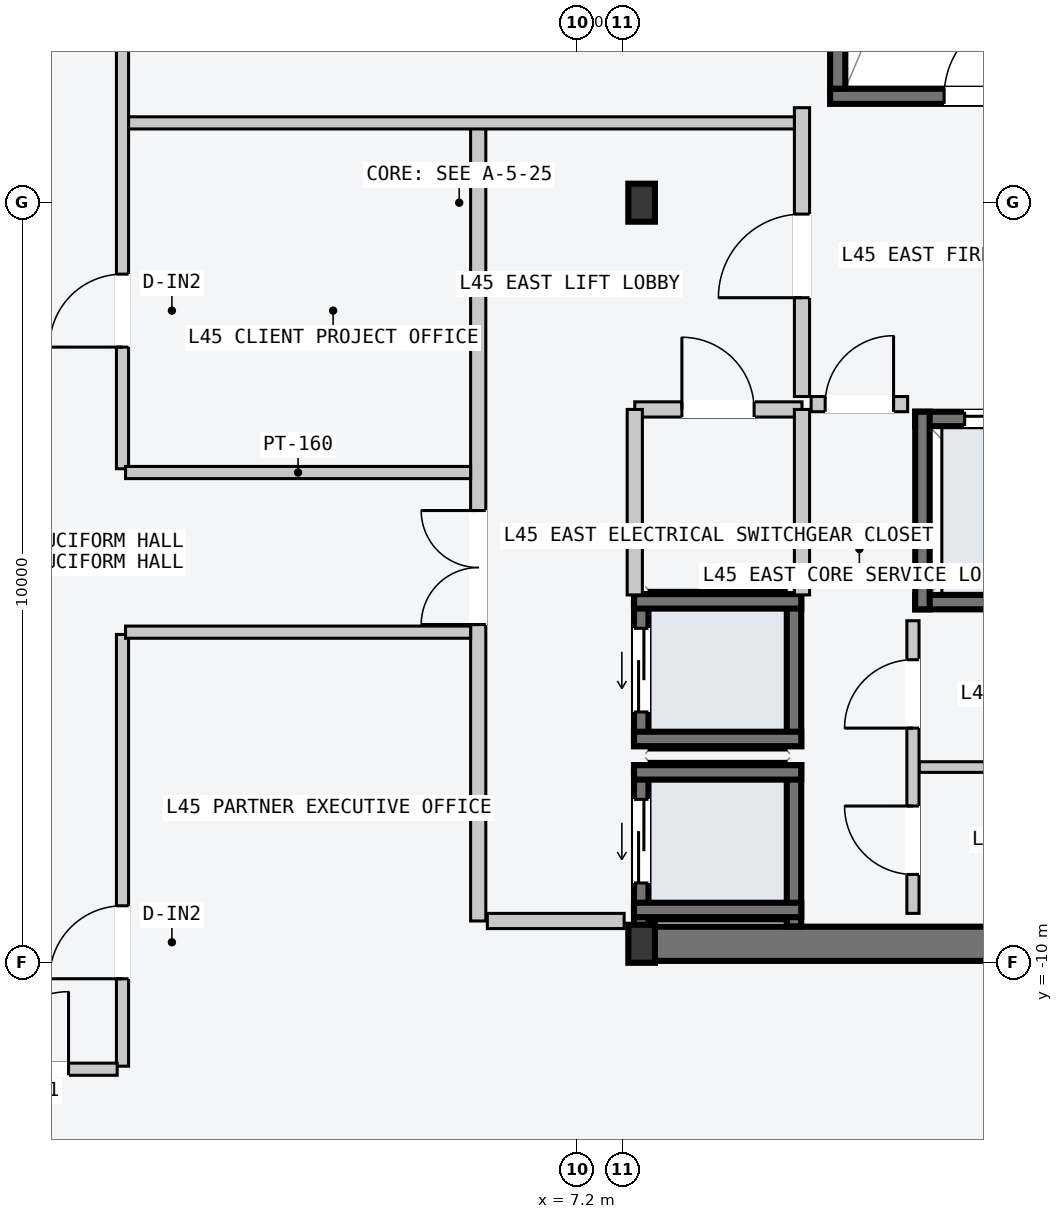
"""IFC4 building model, lengths in metres.
Left out: names, types, materials, properties, quantities, classifications, styles, units other than length and angle.
Written with IfcOpenShell. Run it as: python <this file> out.ifc"""

import sys

from ifc_helpers import new_model, si_unit, direction, frame, frame_2d, origin, origin_2d, place, context, subcontext, project, spatial, rectangle, i_section, extrude, element, fill, save


model = new_model("IFC4")
c1 = context("Model", 3, precision=1e-05, world=origin(), true_north=direction((0.0, 1.0)))
c2 = subcontext(c1, "Body", "Model", "MODEL_VIEW")
j1 = project(units=[si_unit("LENGTHUNIT", "METRE"), si_unit("PLANEANGLEUNIT", "RADIAN")], contexts=[c1])
p1 = place(None, origin())
s1 = spatial("IfcSite", under=j1, at=p1, CompositionType="ELEMENT")
p2 = place(p1, origin())
s2 = spatial("IfcBuilding", under=s1, at=p2, CompositionType="ELEMENT")
p3 = place(p2, frame((0.0, 0.0, 173.1)))
s3 = spatial("IfcBuildingStorey", under=s2, at=p3, CompositionType="ELEMENT", Elevation=173.1)
p4 = place(p3, frame((8.07, -9.75, -0.2), z_axis=(0.0, 0.0, 1.0), x_axis=(1.0, 0.0, 0.0)))
e1 = element("IfcWall", 1, at=p4, inside=s3, PredefinedType="SHEAR", context=c2, shape_type="SweptSolid", body=[
    extrude(rectangle(XDim=6.46, YDim=0.45, at=frame_2d((3.23, 0.0))), origin(), (0.0, 0.0, 1.0), 3.6),
])
p5 = place(p3, frame((10.53, 1.4, -0.2), z_axis=(0.0, 0.0, 1.0), x_axis=(1.0, 0.0, 0.0)))
e2 = element("IfcWall", 2, at=p5, inside=s3, PredefinedType="SOLIDWALL", context=c2, shape_type="SweptSolid", body=[
    extrude(rectangle(XDim=3.72, YDim=0.2, at=frame_2d((1.86, 0.0))), origin(), (0.0, 0.0, 1.0), 3.6),
])
p6 = place(p5, frame((1.5, 0.0, 0.2)))
e3 = element("IfcOpeningElement", 3, at=p6, cuts=e2, PredefinedType="OPENING", context=c2, shape_type="SweptSolid", body=[
    extrude(rectangle(XDim=1.12, YDim=2.18, at=frame_2d((0.56, 1.09))), frame((0.0, 0.11, 0.0), z_axis=(0.0, -1.0, 0.0), x_axis=(1.0, 0.0, 0.0)), (0.0, 0.0, 1.0), 0.22),
])
p7 = place(p3, frame((10.63, 1.5, -0.2), z_axis=(0.0, 0.0, 1.0), x_axis=(0.0, 1.0, 0.0)))
e4 = element("IfcWall", 4, at=p7, inside=s3, PredefinedType="SOLIDWALL", context=c2, shape_type="SweptSolid", body=[
    extrude(rectangle(XDim=7.8, YDim=0.2, at=frame_2d((3.9, 0.0))), origin(), (0.0, 0.0, 1.0), 3.6),
])
for number, where, z_axis, x_axis in (
    (5, (8.05, -9.75, 0.0), (0.0, 0.0, 1.0), (1.0, 0.0, 0.0)),
    (6, (8.05, 0.0, 0.0), (0.0, 0.0, 1.0), (1.0, 0.0, 0.0)),
):
    element("IfcColumn", number, at=place(p3, frame(where, z_axis=z_axis, x_axis=x_axis)), inside=s3, PredefinedType="COLUMN", context=c2, shape_type="SweptSolid", body=[
        extrude(i_section(OverallWidth=0.35, OverallDepth=0.5, WebThickness=0.02, FlangeThickness=0.032, at=origin_2d()), origin(), (0.0, 0.0, 1.0), 3.6),
    ])
p8 = place(p3, frame((8.045, -9.52, -0.2), z_axis=(0.0, 0.0, 1.0), x_axis=(0.0, 1.0, 0.0)))
e7 = element("IfcWall", 7, at=p8, inside=s3, PredefinedType="SOLIDWALL", context=c2, shape_type="SweptSolid", body=[
    extrude(rectangle(XDim=2.12, YDim=0.19, at=frame_2d((1.06, 0.0))), origin(), (0.0, 0.0, 1.0), 3.6),
])
p9 = place(p8, frame((0.57, 0.0, 0.2)))
e8 = element("IfcOpeningElement", 8, at=p9, cuts=e7, PredefinedType="OPENING", context=c2, shape_type="SweptSolid", body=[
    extrude(rectangle(XDim=1.1, YDim=2.2, at=frame_2d((0.55, 1.1))), frame((0.0, 0.105, 0.0), z_axis=(0.0, -1.0, 0.0), x_axis=(1.0, 0.0, 0.0)), (0.0, 0.0, 1.0), 0.21),
])
p10 = place(p3, frame((10.055, -9.52, -0.2), z_axis=(0.0, 0.0, 1.0), x_axis=(0.0, 1.0, 0.0)))
e9 = element("IfcWall", 9, at=p10, inside=s3, PredefinedType="SOLIDWALL", context=c2, shape_type="SweptSolid", body=[
    extrude(rectangle(XDim=2.12, YDim=0.19, at=frame_2d((1.06, 0.0))), origin(), (0.0, 0.0, 1.0), 3.6),
])
for number, where, z_axis, x_axis in (
    (10, (7.95, -7.495, -0.2), (0.0, 0.0, 1.0), (1.0, 0.0, 0.0)),
    (11, (7.95, -9.305, -0.2), (0.0, 0.0, 1.0), (1.0, 0.0, 0.0)),
):
    element("IfcWall", number, at=place(p3, frame(where, z_axis=z_axis, x_axis=x_axis)), inside=s3, PredefinedType="SOLIDWALL", context=c2, shape_type="SweptSolid", body=[
        extrude(rectangle(XDim=2.2, YDim=0.19, at=frame_2d((1.1, 0.0))), origin(), (0.0, 0.0, 1.0), 3.6),
    ])
p11 = place(p3, frame((8.045, -7.15, -0.2), z_axis=(0.0, 0.0, 1.0), x_axis=(0.0, 1.0, 0.0)))
e12 = element("IfcWall", 12, at=p11, inside=s3, PredefinedType="SOLIDWALL", context=c2, shape_type="SweptSolid", body=[
    extrude(rectangle(XDim=2.0, YDim=0.19, at=frame_2d((1.0, 0.0))), origin(), (0.0, 0.0, 1.0), 3.6),
])
p12 = place(p11, frame((0.45, 0.0, 0.2)))
e13 = element("IfcOpeningElement", 13, at=p12, cuts=e12, PredefinedType="OPENING", context=c2, shape_type="SweptSolid", body=[
    extrude(rectangle(XDim=1.1, YDim=2.2, at=frame_2d((0.55, 1.1))), frame((0.0, 0.105, 0.0), z_axis=(0.0, -1.0, 0.0), x_axis=(1.0, 0.0, 0.0)), (0.0, 0.0, 1.0), 0.21),
])
p13 = place(p3, frame((10.055, -7.15, -0.2), z_axis=(0.0, 0.0, 1.0), x_axis=(0.0, 1.0, 0.0)))
e14 = element("IfcWall", 14, at=p13, inside=s3, PredefinedType="SOLIDWALL", context=c2, shape_type="SweptSolid", body=[
    extrude(rectangle(XDim=2.0, YDim=0.19, at=frame_2d((1.0, 0.0))), origin(), (0.0, 0.0, 1.0), 3.6),
])
for number, where, z_axis, x_axis in (
    (15, (7.95, -5.245, -0.2), (0.0, 0.0, 1.0), (1.0, 0.0, 0.0)),
    (16, (7.95, -7.055, -0.2), (0.0, 0.0, 1.0), (1.0, 0.0, 0.0)),
):
    element("IfcWall", number, at=place(p3, frame(where, z_axis=z_axis, x_axis=x_axis)), inside=s3, PredefinedType="SOLIDWALL", context=c2, shape_type="SweptSolid", body=[
        extrude(rectangle(XDim=2.2, YDim=0.19, at=frame_2d((1.1, 0.0))), origin(), (0.0, 0.0, 1.0), 3.6),
    ])
p14 = place(p3, frame((11.65, -2.845, -0.2), z_axis=(0.0, 0.0, 1.0), x_axis=(1.0, 0.0, 0.0)))
e17 = element("IfcWall", 17, at=p14, inside=s3, PredefinedType="SOLIDWALL", context=c2, shape_type="SweptSolid", body=[
    extrude(rectangle(XDim=2.68, YDim=0.19, at=frame_2d((1.34, 0.0))), origin(), (0.0, 0.0, 1.0), 3.6),
])
p15 = place(p14, frame((0.65, 0.0, 0.2)))
e18 = element("IfcOpeningElement", 18, at=p15, cuts=e17, PredefinedType="OPENING", context=c2, shape_type="SweptSolid", body=[
    extrude(rectangle(XDim=1.2, YDim=2.2, at=frame_2d((0.6, 1.1))), frame((0.0, 0.105, 0.0), z_axis=(0.0, -1.0, 0.0), x_axis=(1.0, 0.0, 0.0)), (0.0, 0.0, 1.0), 0.21),
])
p16 = place(p3, frame((11.65, -5.255, -0.2), z_axis=(0.0, 0.0, 1.0), x_axis=(1.0, 0.0, 0.0)))
e19 = element("IfcWall", 19, at=p16, inside=s3, PredefinedType="SOLIDWALL", context=c2, shape_type="SweptSolid", body=[
    extrude(rectangle(XDim=2.68, YDim=0.19, at=frame_2d((1.34, 0.0))), origin(), (0.0, 0.0, 1.0), 3.6),
])
p17 = place(p3, frame((11.745, -5.35, -0.2), z_axis=(0.0, 0.0, 1.0), x_axis=(0.0, 1.0, 0.0)))
e20 = element("IfcWall", 20, at=p17, inside=s3, PredefinedType="SOLIDWALL", context=c2, shape_type="SweptSolid", body=[
    extrude(rectangle(XDim=2.6, YDim=0.19, at=frame_2d((1.3, 0.0))), origin(), (0.0, 0.0, 1.0), 3.6),
])
p18 = place(p3, frame((5.9, -9.45, 0.0), z_axis=(0.0, 0.0, 1.0), x_axis=(0.0, 1.0, 0.0)))
e21 = element("IfcWall", 21, at=p18, inside=s3, PredefinedType="PARTITIONING", context=c2, shape_type="SweptSolid", body=[
    extrude(rectangle(XDim=10.5, YDim=0.2, at=frame_2d((5.25, 0.0))), origin(), (0.0, 0.0, 1.0), 3.4),
])
p19 = place(p18, frame((3.9, 0.0, 0.0)))
e22 = element("IfcOpeningElement", 22, at=p19, cuts=e21, PredefinedType="OPENING", context=c2, shape_type="SweptSolid", body=[
    extrude(rectangle(XDim=1.5, YDim=2.2, at=frame_2d((0.75, 1.1))), frame((0.0, 0.11, 0.0), z_axis=(0.0, -1.0, 0.0), x_axis=(1.0, 0.0, 0.0)), (0.0, 0.0, 1.0), 0.22),
])
p20 = place(p3, frame((6.02, -9.45, 0.0), z_axis=(0.0, 0.0, 1.0), x_axis=(1.0, 0.0, 0.0)))
e23 = element("IfcWall", 23, at=p20, inside=s3, PredefinedType="PARTITIONING", context=c2, shape_type="SweptSolid", body=[
    extrude(rectangle(XDim=1.8, YDim=0.2, at=frame_2d((0.9, 0.0))), origin(), (0.0, 0.0, 1.0), 3.4),
])
p21 = place(p3, frame((10.16, -2.55, 0.0), z_axis=(0.0, 0.0, 1.0), x_axis=(0.0, 1.0, 0.0)))
e24 = element("IfcWall", 24, at=p21, inside=s3, PredefinedType="PARTITIONING", context=c2, shape_type="SweptSolid", body=[
    extrude(rectangle(XDim=3.8, YDim=0.2, at=frame_2d((1.9, 0.0))), origin(), (0.0, 0.0, 1.0), 3.4),
])
p22 = place(p21, frame((1.3, 0.0, 0.0)))
e25 = element("IfcOpeningElement", 25, at=p22, cuts=e24, PredefinedType="OPENING", context=c2, shape_type="SweptSolid", body=[
    extrude(rectangle(XDim=1.1, YDim=2.15, at=frame_2d((0.55, 1.075))), frame((0.0, 0.11, 0.0), z_axis=(0.0, -1.0, 0.0), x_axis=(1.0, 0.0, 0.0)), (0.0, 0.0, 1.0), 0.22),
])
p23 = place(p3, frame((10.28, -2.65, 0.0), z_axis=(0.0, 0.0, 1.0), x_axis=(1.0, 0.0, 0.0)))
e26 = element("IfcWall", 26, at=p23, inside=s3, PredefinedType="PARTITIONING", context=c2, shape_type="SweptSolid", body=[
    extrude(rectangle(XDim=1.27, YDim=0.2, at=frame_2d((0.635, 0.0))), origin(), (0.0, 0.0, 1.0), 3.4),
])
p24 = place(p23, frame((0.185, 0.0, 0.0)))
e27 = element("IfcOpeningElement", 27, at=p24, cuts=e26, PredefinedType="OPENING", context=c2, shape_type="SweptSolid", body=[
    extrude(rectangle(XDim=0.9, YDim=2.15, at=frame_2d((0.45, 1.075))), frame((0.0, 0.11, 0.0), z_axis=(0.0, -1.0, 0.0), x_axis=(1.0, 0.0, 0.0)), (0.0, 0.0, 1.0), 0.22),
])
p25 = place(p3, frame((7.96, -2.72, 0.0), z_axis=(0.0, 0.0, 1.0), x_axis=(1.0, 0.0, 0.0)))
e28 = element("IfcWall", 28, at=p25, inside=s3, PredefinedType="PARTITIONING", context=c2, shape_type="SweptSolid", body=[
    extrude(rectangle(XDim=2.2, YDim=0.2, at=frame_2d((1.1, 0.0))), origin(), (0.0, 0.0, 1.0), 3.4),
])
p26 = place(p25, frame((0.62, 0.0, 0.0)))
e29 = element("IfcOpeningElement", 29, at=p26, cuts=e28, PredefinedType="OPENING", context=c2, shape_type="SweptSolid", body=[
    extrude(rectangle(XDim=0.95, YDim=2.1, at=frame_2d((0.475, 1.05))), frame((0.0, 0.11, 0.0), z_axis=(0.0, -1.0, 0.0), x_axis=(1.0, 0.0, 0.0)), (0.0, 0.0, 1.0), 0.22),
])
for number, where, z_axis, x_axis in (
    (30, (7.96, -5.16, 0.0), (0.0, 0.0, 1.0), (0.0, 1.0, 0.0)),
    (31, (10.16, -5.16, 0.0), (0.0, 0.0, 1.0), (0.0, 1.0, 0.0)),
):
    element("IfcWall", number, at=place(p3, frame(where, z_axis=z_axis, x_axis=x_axis)), inside=s3, PredefinedType="PARTITIONING", context=c2, shape_type="SweptSolid", body=[
        extrude(rectangle(XDim=2.44, YDim=0.2, at=frame_2d((1.22, 0.0))), origin(), (0.0, 0.0, 1.0), 3.4),
    ])
p27 = place(p3, frame((11.7, -7.425, 0.0), z_axis=(0.0, 0.0, 1.0), x_axis=(1.0, 0.0, 0.0)))
e32 = element("IfcWall", 32, at=p27, inside=s3, PredefinedType="PARTITIONING", context=c2, shape_type="SweptSolid", body=[
    extrude(rectangle(XDim=2.5, YDim=0.14, at=frame_2d((1.25, 0.0))), origin(), (0.0, 0.0, 1.0), 3.4),
])
p28 = place(p3, frame((11.62, -9.35, 0.0), z_axis=(0.0, 0.0, 1.0), x_axis=(0.0, 1.0, 0.0)))
e33 = element("IfcWall", 33, at=p28, inside=s3, PredefinedType="PARTITIONING", context=c2, shape_type="SweptSolid", body=[
    extrude(rectangle(XDim=3.85, YDim=0.16, at=frame_2d((1.925, 0.0))), origin(), (0.0, 0.0, 1.0), 3.4),
])
p29 = place(p28, frame((0.512, 0.0, 0.0)))
e34 = element("IfcOpeningElement", 34, at=p29, cuts=e33, PredefinedType="OPENING", context=c2, shape_type="SweptSolid", body=[
    extrude(rectangle(XDim=0.9, YDim=2.15, at=frame_2d((0.45, 1.075))), frame((0.0, 0.09, 0.0), z_axis=(0.0, -1.0, 0.0), x_axis=(1.0, 0.0, 0.0)), (0.0, 0.0, 1.0), 0.18),
])
p30 = place(p28, frame((2.438, 0.0, 0.0)))
e35 = element("IfcOpeningElement", 35, at=p30, cuts=e33, PredefinedType="OPENING", context=c2, shape_type="SweptSolid", body=[
    extrude(rectangle(XDim=0.9, YDim=2.15, at=frame_2d((0.45, 1.075))), frame((0.0, 0.09, 0.0), z_axis=(0.0, -1.0, 0.0), x_axis=(1.0, 0.0, 0.0)), (0.0, 0.0, 1.0), 0.18),
])
p31 = place(p3, frame((1.26, 1.05, 0.0), z_axis=(0.0, 0.0, 1.0), x_axis=(1.0, 0.0, 0.0)))
e36 = element("IfcWall", 36, at=p31, inside=s3, PredefinedType="PARTITIONING", context=c2, shape_type="SweptSolid", body=[
    extrude(rectangle(XDim=8.8, YDim=0.16, at=frame_2d((4.4, 0.0))), origin(), (0.0, 0.0, 1.0), 3.4),
])
p32 = place(p3, frame((1.22, -3.5, 0.0), z_axis=(0.0, 0.0, 1.0), x_axis=(0.0, 1.0, 0.0)))
e37 = element("IfcWall", 37, at=p32, inside=s3, PredefinedType="PARTITIONING", context=c2, shape_type="SweptSolid", body=[
    extrude(rectangle(XDim=14.86, YDim=0.16, at=frame_2d((7.43, 0.0))), origin(), (0.0, 0.0, 1.0), 3.4),
])
p33 = place(p32, frame((6.1, 0.0, 0.0)))
e38 = element("IfcOpeningElement", 38, at=p33, cuts=e37, PredefinedType="OPENING", context=c2, shape_type="SweptSolid", body=[
    extrude(rectangle(XDim=1.24, YDim=2.24, at=frame_2d((0.62, 1.12))), frame((0.0, 0.09, 0.0), z_axis=(0.0, -1.0, 0.0), x_axis=(1.0, 0.0, 0.0)), (0.0, 0.0, 1.0), 0.18),
])
p34 = place(p32, frame((1.6, 0.0, 0.0)))
e39 = element("IfcOpeningElement", 39, at=p34, cuts=e37, PredefinedType="OPENING", context=c2, shape_type="SweptSolid", body=[
    extrude(rectangle(XDim=0.96, YDim=2.18, at=frame_2d((0.48, 1.09))), frame((0.0, 0.09, 0.0), z_axis=(0.0, -1.0, 0.0), x_axis=(1.0, 0.0, 0.0)), (0.0, 0.0, 1.0), 0.18),
])
p35 = place(p3, frame((1.26, -3.55, 0.0), z_axis=(0.0, 0.0, 1.0), x_axis=(1.0, 0.0, 0.0)))
e40 = element("IfcWall", 40, at=p35, inside=s3, PredefinedType="PARTITIONING", context=c2, shape_type="SweptSolid", body=[
    extrude(rectangle(XDim=4.54, YDim=0.16, at=frame_2d((2.27, 0.0))), origin(), (0.0, 0.0, 1.0), 3.4),
])
p36 = place(p3, frame((1.22, -11.36, 0.0), z_axis=(0.0, 0.0, 1.0), x_axis=(0.0, 1.0, 0.0)))
e41 = element("IfcWall", 41, at=p36, inside=s3, PredefinedType="PARTITIONING", context=c2, shape_type="SweptSolid", body=[
    extrude(rectangle(XDim=5.68, YDim=0.16, at=frame_2d((2.84, 0.0))), origin(), (0.0, 0.0, 1.0), 3.4),
])
p37 = place(p36, frame((1.15, 0.0, 0.0)))
e42 = element("IfcOpeningElement", 42, at=p37, cuts=e41, PredefinedType="OPENING", context=c2, shape_type="SweptSolid", body=[
    extrude(rectangle(XDim=0.96, YDim=2.18, at=frame_2d((0.48, 1.09))), frame((0.0, 0.09, 0.0), z_axis=(0.0, -1.0, 0.0), x_axis=(1.0, 0.0, 0.0)), (0.0, 0.0, 1.0), 0.18),
])
p38 = place(p3, frame((1.26, -5.65, 0.0), z_axis=(0.0, 0.0, 1.0), x_axis=(1.0, 0.0, 0.0)))
e43 = element("IfcWall", 43, at=p38, inside=s3, PredefinedType="PARTITIONING", context=c2, shape_type="SweptSolid", body=[
    extrude(rectangle(XDim=4.54, YDim=0.16, at=frame_2d((2.27, 0.0))), origin(), (0.0, 0.0, 1.0), 3.4),
])
p39 = place(p3, frame((-1.15, -11.4, 0.0), z_axis=(0.0, 0.0, 1.0), x_axis=(1.0, 0.0, 0.0)))
e44 = element("IfcWall", 44, at=p39, inside=s3, PredefinedType="PARTITIONING", context=c2, shape_type="SweptSolid", body=[
    extrude(rectangle(XDim=2.3, YDim=0.16, at=frame_2d((1.15, 0.0))), origin(), (0.0, 0.0, 1.0), 3.4),
])
p40 = place(p39, frame((0.64, 0.0, 0.0)))
e45 = element("IfcOpeningElement", 45, at=p40, cuts=e44, PredefinedType="OPENING", context=c2, shape_type="SweptSolid", body=[
    extrude(rectangle(XDim=1.02, YDim=2.2, at=frame_2d((0.51, 1.1))), frame((0.0, 0.09, 0.0), z_axis=(0.0, -1.0, 0.0), x_axis=(1.0, 0.0, 0.0)), (0.0, 0.0, 1.0), 0.18),
])
p41 = place(p6, origin())
e46 = element("IfcDoor", 46, at=p41, inside=s3, OperationType="SINGLE_SWING_RIGHT", PredefinedType="DOOR", context=c2, shape_type="SweptSolid", body=[
    extrude(rectangle(XDim=1.12, YDim=2.18, at=frame_2d((0.56, 1.09))), frame((0.0, 0.025, 0.0), z_axis=(0.0, -1.0, 0.0), x_axis=(1.0, 0.0, 0.0)), (0.0, 0.0, 1.0), 0.05),
])
fill(e3, e46)
p42 = place(p9, origin())
e47 = element("IfcDoor", 47, at=p42, inside=s3, OperationType="SLIDING_TO_LEFT", PredefinedType="DOOR", context=c2, shape_type="SweptSolid", body=[
    extrude(rectangle(XDim=1.1, YDim=2.2, at=frame_2d((0.55, 1.1))), frame((0.0, 0.025, 0.0), z_axis=(0.0, -1.0, 0.0), x_axis=(1.0, 0.0, 0.0)), (0.0, 0.0, 1.0), 0.05),
])
fill(e8, e47)
p43 = place(p12, origin())
e48 = element("IfcDoor", 48, at=p43, inside=s3, OperationType="SLIDING_TO_LEFT", PredefinedType="DOOR", context=c2, shape_type="SweptSolid", body=[
    extrude(rectangle(XDim=1.1, YDim=2.2, at=frame_2d((0.55, 1.1))), frame((0.0, 0.025, 0.0), z_axis=(0.0, -1.0, 0.0), x_axis=(1.0, 0.0, 0.0)), (0.0, 0.0, 1.0), 0.05),
])
fill(e13, e48)
p44 = place(p15, origin())
e49 = element("IfcDoor", 49, at=p44, inside=s3, OperationType="SLIDING_TO_LEFT", PredefinedType="DOOR", context=c2, shape_type="SweptSolid", body=[
    extrude(rectangle(XDim=1.2, YDim=2.2, at=frame_2d((0.6, 1.1))), frame((0.0, 0.025, 0.0), z_axis=(0.0, -1.0, 0.0), x_axis=(1.0, 0.0, 0.0)), (0.0, 0.0, 1.0), 0.05),
])
fill(e18, e49)
p45 = place(p19, origin())
e50 = element("IfcDoor", 50, at=p45, inside=s3, OperationType="DOUBLE_DOOR_SINGLE_SWING", PredefinedType="DOOR", context=c2, shape_type="SweptSolid", body=[
    extrude(rectangle(XDim=1.5, YDim=2.2, at=frame_2d((0.75, 1.1))), frame((0.0, 0.025, 0.0), z_axis=(0.0, -1.0, 0.0), x_axis=(1.0, 0.0, 0.0)), (0.0, 0.0, 1.0), 0.05),
])
fill(e22, e50)
p46 = place(p22, origin())
e51 = element("IfcDoor", 51, at=p46, inside=s3, OperationType="SINGLE_SWING_LEFT", PredefinedType="DOOR", context=c2, shape_type="SweptSolid", body=[
    extrude(rectangle(XDim=1.1, YDim=2.15, at=frame_2d((0.55, 1.075))), frame((0.0, 0.025, 0.0), z_axis=(0.0, -1.0, 0.0), x_axis=(1.0, 0.0, 0.0)), (0.0, 0.0, 1.0), 0.05),
])
fill(e25, e51)
p47 = place(p24, origin())
e52 = element("IfcDoor", 52, at=p47, inside=s3, OperationType="SINGLE_SWING_RIGHT", PredefinedType="DOOR", context=c2, shape_type="SweptSolid", body=[
    extrude(rectangle(XDim=0.9, YDim=2.15, at=frame_2d((0.45, 1.075))), frame((0.0, 0.025, 0.0), z_axis=(0.0, -1.0, 0.0), x_axis=(1.0, 0.0, 0.0)), (0.0, 0.0, 1.0), 0.05),
])
fill(e27, e52)
p48 = place(p26, origin())
e53 = element("IfcDoor", 53, at=p48, inside=s3, OperationType="SINGLE_SWING_LEFT", PredefinedType="DOOR", context=c2, shape_type="SweptSolid", body=[
    extrude(rectangle(XDim=0.95, YDim=2.1, at=frame_2d((0.475, 1.05))), frame((0.0, 0.025, 0.0), z_axis=(0.0, -1.0, 0.0), x_axis=(1.0, 0.0, 0.0)), (0.0, 0.0, 1.0), 0.05),
])
fill(e29, e53)
p49 = place(p29, origin())
e54 = element("IfcDoor", 54, at=p49, inside=s3, OperationType="SINGLE_SWING_RIGHT", PredefinedType="DOOR", context=c2, shape_type="SweptSolid", body=[
    extrude(rectangle(XDim=0.9, YDim=2.15, at=frame_2d((0.45, 1.075))), frame((0.0, 0.025, 0.0), z_axis=(0.0, -1.0, 0.0), x_axis=(1.0, 0.0, 0.0)), (0.0, 0.0, 1.0), 0.05),
])
fill(e34, e54)
p50 = place(p30, origin())
e55 = element("IfcDoor", 55, at=p50, inside=s3, OperationType="SINGLE_SWING_LEFT", PredefinedType="DOOR", context=c2, shape_type="SweptSolid", body=[
    extrude(rectangle(XDim=0.9, YDim=2.15, at=frame_2d((0.45, 1.075))), frame((0.0, 0.025, 0.0), z_axis=(0.0, -1.0, 0.0), x_axis=(1.0, 0.0, 0.0)), (0.0, 0.0, 1.0), 0.05),
])
fill(e35, e55)
p51 = place(p34, origin())
e56 = element("IfcDoor", 56, at=p51, inside=s3, OperationType="SINGLE_SWING_LEFT", PredefinedType="DOOR", context=c2, shape_type="SweptSolid", body=[
    extrude(rectangle(XDim=0.96, YDim=2.18, at=frame_2d((0.48, 1.09))), frame((0.0, 0.025, 0.0), z_axis=(0.0, -1.0, 0.0), x_axis=(1.0, 0.0, 0.0)), (0.0, 0.0, 1.0), 0.05),
])
fill(e39, e56)
p52 = place(p37, origin())
e57 = element("IfcDoor", 57, at=p52, inside=s3, OperationType="SINGLE_SWING_LEFT", PredefinedType="DOOR", context=c2, shape_type="SweptSolid", body=[
    extrude(rectangle(XDim=0.96, YDim=2.18, at=frame_2d((0.48, 1.09))), frame((0.0, 0.025, 0.0), z_axis=(0.0, -1.0, 0.0), x_axis=(1.0, 0.0, 0.0)), (0.0, 0.0, 1.0), 0.05),
])
fill(e42, e57)
p53 = place(p40, origin())
e58 = element("IfcDoor", 58, at=p53, inside=s3, OperationType="SINGLE_SWING_RIGHT", PredefinedType="DOOR", context=c2, shape_type="SweptSolid", body=[
    extrude(rectangle(XDim=1.02, YDim=2.2, at=frame_2d((0.51, 1.1))), frame((0.0, 0.025, 0.0), z_axis=(0.0, -1.0, 0.0), x_axis=(1.0, 0.0, 0.0)), (0.0, 0.0, 1.0), 0.05),
])
fill(e45, e58)
save(model, sys.argv[1])
